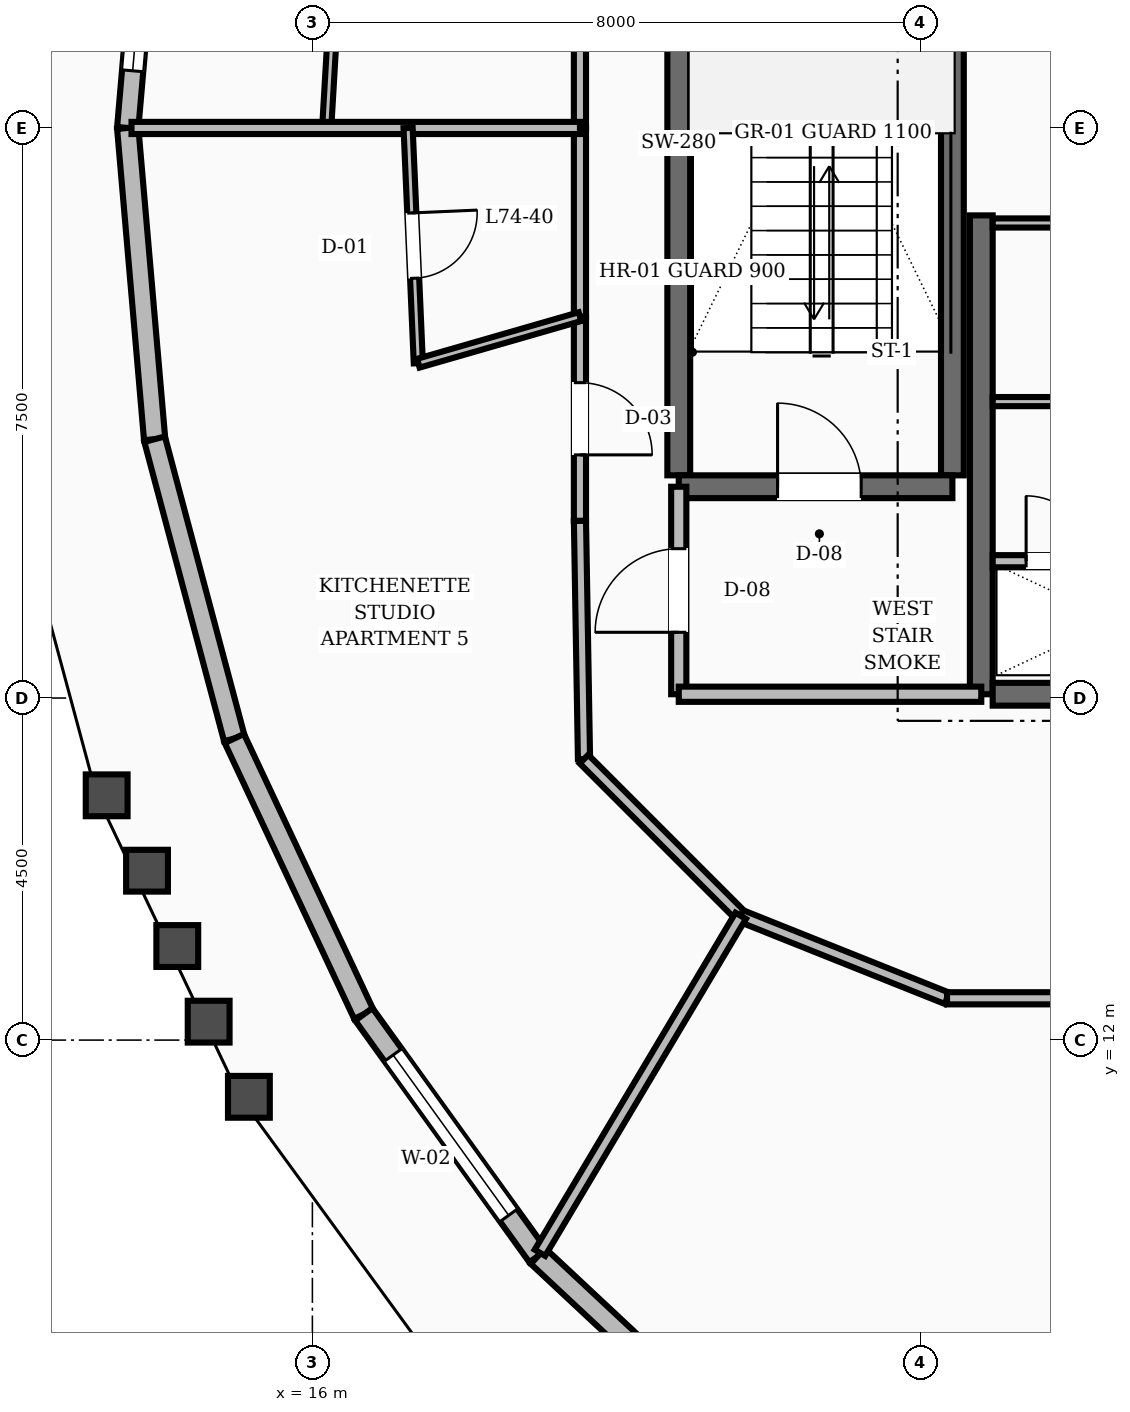
"""IFC4 building model, lengths in metres.
Left out: names, types, materials, properties, quantities, classifications, styles, units other than length and angle.
Written with IfcOpenShell. Run it as: python <this file> out.ifc"""

import sys

from ifc_helpers import new_model, si_unit, direction, frame, frame_2d, origin, place, context, subcontext, project, spatial, rectangle, extrude, element, fill, save


model = new_model("IFC4")
c1 = context("Model", 3, precision=1e-05, world=origin(), true_north=direction((0.0, 1.0)))
c2 = subcontext(c1, "Body", "Model", "MODEL_VIEW")
j1 = project(units=[si_unit("LENGTHUNIT", "METRE"), si_unit("PLANEANGLEUNIT", "RADIAN")], contexts=[c1])
p1 = place(None, origin())
s1 = spatial("IfcSite", under=j1, at=p1, CompositionType="ELEMENT")
p2 = place(p1, origin())
s2 = spatial("IfcBuilding", under=s1, at=p2, CompositionType="ELEMENT")
p3 = place(p2, frame((0.0, 0.0, 283.2)))
s3 = spatial("IfcBuildingStorey", under=s2, at=p3, CompositionType="ELEMENT", Elevation=283.2)
p4 = place(p3, frame((24.8, 16.55, 0.0), z_axis=(0.0, 0.0, 1.0), x_axis=(0.0, 1.0, 0.0)))
e1 = element("IfcWall", 1, at=p4, inside=s3, PredefinedType="SHEAR", context=c2, shape_type="SweptSolid", body=[
    extrude(rectangle(XDim=6.3, YDim=0.3, at=frame_2d((3.15, 0.0))), origin(), (0.0, 0.0, 1.0), 3.6),
])
p5 = place(p3, frame((24.95, 16.55, 0.0), z_axis=(0.0, 0.0, 1.0), x_axis=(1.0, 0.0, 0.0)))
e2 = element("IfcWall", 2, at=p5, inside=s3, PredefinedType="SHEAR", context=c2, shape_type="SweptSolid", body=[
    extrude(rectangle(XDim=3.25, YDim=0.3, at=frame_2d((1.625, 0.0))), origin(), (0.0, 0.0, 1.0), 3.6),
])
for number, where, z_axis, x_axis in (
    (3, (20.82, 19.43, 0.0), (0.0, 0.0, 1.0), (0.0, 1.0, 0.0)),
    (4, (24.42, 19.43, 0.0), (0.0, 0.0, 1.0), (0.0, 1.0, 0.0)),
):
    element("IfcWall", number, at=place(p3, frame(where, z_axis=z_axis, x_axis=x_axis)), inside=s3, PredefinedType="SHEAR", context=c2, shape_type="SweptSolid", body=[
        extrude(rectangle(XDim=8.74, YDim=0.3, at=frame_2d((4.37, 0.0))), origin(), (0.0, 0.0, 1.0), 3.6),
    ])
p6 = place(p3, frame((20.82, 19.28, 0.0), z_axis=(0.0, 0.0, 1.0), x_axis=(1.0, 0.0, 0.0)))
e5 = element("IfcWall", 5, at=p6, inside=s3, PredefinedType="SHEAR", context=c2, shape_type="SweptSolid", body=[
    extrude(rectangle(XDim=3.6, YDim=0.3, at=frame_2d((1.8, 0.0))), origin(), (0.0, 0.0, 1.0), 3.6),
])
p7 = place(p6, frame((1.3, 0.0, 0.0)))
e6 = element("IfcOpeningElement", 6, at=p7, cuts=e5, PredefinedType="OPENING", context=c2, shape_type="SweptSolid", body=[
    extrude(rectangle(XDim=1.1, YDim=2.1, at=frame_2d((0.55, 1.05))), frame((0.0, 0.16, 0.0), z_axis=(0.0, -1.0, 0.0), x_axis=(1.0, 0.0, 0.0)), (0.0, 0.0, 1.0), 0.32),
])
p8 = place(p3, frame((13.924, 28.095, 0.0), z_axis=(0.0, 0.0, 1.0), x_axis=(-0.086132326102, -0.996283705779, 0.0)))
e7 = element("IfcWall", 7, at=p8, inside=s3, PredefinedType="STANDARD", context=c2, shape_type="SweptSolid", body=[
    extrude(rectangle(XDim=4.11, YDim=0.28, at=frame_2d((2.055, 0.0))), origin(), (0.0, 0.0, 1.0), 2.88),
])
p9 = place(p8, frame((0.755, 0.0, 0.8)))
e8 = element("IfcOpeningElement", 8, at=p9, cuts=e7, PredefinedType="OPENING", context=c2, shape_type="SweptSolid", body=[
    extrude(rectangle(XDim=2.6, YDim=1.65, at=frame_2d((1.3, 0.825))), frame((0.0, 0.15, 0.0), z_axis=(0.0, -1.0, 0.0), x_axis=(1.0, 0.0, 0.0)), (0.0, 0.0, 1.0), 0.3),
])
p10 = place(p3, frame((13.57, 24.0, 0.0), z_axis=(0.0, 0.0, 1.0), x_axis=(0.086132326102, -0.996283705779, 0.0)))
e9 = element("IfcWall", 9, at=p10, inside=s3, PredefinedType="STANDARD", context=c2, shape_type="SweptSolid", body=[
    extrude(rectangle(XDim=4.11, YDim=0.28, at=frame_2d((2.055, 0.0))), origin(), (0.0, 0.0, 1.0), 2.88),
])
p11 = place(p3, frame((13.924, 19.905, 0.0), z_axis=(0.0, 0.0, 1.0), x_axis=(0.257409045533, -0.966302531963, 0.0)))
e10 = element("IfcWall", 10, at=p11, inside=s3, PredefinedType="STANDARD", context=c2, shape_type="SweptSolid", body=[
    extrude(rectangle(XDim=4.074, YDim=0.28, at=frame_2d((2.037, 0.0))), origin(), (0.0, 0.0, 1.0), 2.88),
])
p12 = place(p3, frame((14.973, 15.968, 0.0), z_axis=(0.0, 0.0, 1.0), x_axis=(0.424881672648, -0.905248896297, 0.0)))
e11 = element("IfcWall", 11, at=p12, inside=s3, PredefinedType="STANDARD", context=c2, shape_type="SweptSolid", body=[
    extrude(rectangle(XDim=4.009, YDim=0.28, at=frame_2d((2.004, 0.0))), origin(), (0.0, 0.0, 1.0), 2.88),
])
p13 = place(p3, frame((16.676, 12.339, 0.0), z_axis=(0.0, 0.0, 1.0), x_axis=(0.584655758142, -0.811281482884, 0.0)))
e12 = element("IfcWall", 12, at=p13, inside=s3, PredefinedType="STANDARD", context=c2, shape_type="SweptSolid", body=[
    extrude(rectangle(XDim=3.92, YDim=0.28, at=frame_2d((1.96, 0.0))), origin(), (0.0, 0.0, 1.0), 2.88),
])
p14 = place(p13, frame((0.66, 0.0, 0.8)))
e13 = element("IfcOpeningElement", 13, at=p14, cuts=e12, PredefinedType="OPENING", context=c2, shape_type="SweptSolid", body=[
    extrude(rectangle(XDim=2.6, YDim=1.65, at=frame_2d((1.3, 0.825))), frame((0.0, 0.15, 0.0), z_axis=(0.0, -1.0, 0.0), x_axis=(1.0, 0.0, 0.0)), (0.0, 0.0, 1.0), 0.3),
])
p15 = place(p3, frame((18.968, 9.159, 0.0), z_axis=(0.0, 0.0, 1.0), x_axis=(0.730558106244, -0.682850535184, 0.0)))
e14 = element("IfcWall", 14, at=p15, inside=s3, PredefinedType="STANDARD", context=c2, shape_type="SweptSolid", body=[
    extrude(rectangle(XDim=3.823, YDim=0.28, at=frame_2d((1.911, 0.0))), origin(), (0.0, 0.0, 1.0), 2.88),
])
p16 = place(p3, frame((20.82, 16.55, 0.0), z_axis=(0.0, 0.0, 1.0), x_axis=(0.0, 1.0, 0.0)))
e15 = element("IfcWall", 15, at=p16, inside=s3, PredefinedType="SOLIDWALL", context=c2, shape_type="SweptSolid", body=[
    extrude(rectangle(XDim=2.73, YDim=0.2, at=frame_2d((1.365, 0.0))), origin(), (0.0, 0.0, 1.0), 2.87),
])
p17 = place(p16, frame((0.815, 0.0, 0.0)))
e16 = element("IfcOpeningElement", 16, at=p17, cuts=e15, PredefinedType="OPENING", context=c2, shape_type="SweptSolid", body=[
    extrude(rectangle(XDim=1.1, YDim=2.1, at=frame_2d((0.55, 1.05))), frame((0.0, 0.11, 0.0), z_axis=(0.0, -1.0, 0.0), x_axis=(1.0, 0.0, 0.0)), (0.0, 0.0, 1.0), 0.22),
])
p18 = place(p3, frame((20.82, 16.55, 0.0), z_axis=(0.0, 0.0, 1.0), x_axis=(1.0, 0.0, 0.0)))
e17 = element("IfcWall", 17, at=p18, inside=s3, PredefinedType="SOLIDWALL", context=c2, shape_type="SweptSolid", body=[
    extrude(rectangle(XDim=3.98, YDim=0.2, at=frame_2d((1.99, 0.0))), origin(), (0.0, 0.0, 1.0), 2.87),
])
p19 = place(p3, frame((24.95, 18.3, 0.0), z_axis=(0.0, 0.0, 1.0), x_axis=(1.0, 0.0, 0.0)))
e18 = element("IfcWall", 18, at=p19, inside=s3, PredefinedType="SOLIDWALL", context=c2, shape_type="SweptSolid", body=[
    extrude(rectangle(XDim=3.2, YDim=0.16, at=frame_2d((1.6, 0.0))), origin(), (0.0, 0.0, 1.0), 2.87),
])
p20 = place(p19, frame((0.44, 0.0, 0.0)))
e19 = element("IfcOpeningElement", 19, at=p20, cuts=e18, PredefinedType="OPENING", context=c2, shape_type="SweptSolid", body=[
    extrude(rectangle(XDim=0.86, YDim=2.05, at=frame_2d((0.43, 1.025))), frame((0.0, 0.09, 0.0), z_axis=(0.0, -1.0, 0.0), x_axis=(1.0, 0.0, 0.0)), (0.0, 0.0, 1.0), 0.18),
])
p21 = place(p3, frame((24.95, 22.75, 0.0), z_axis=(0.0, 0.0, 1.0), x_axis=(1.0, 0.0, 0.0)))
e20 = element("IfcWall", 20, at=p21, inside=s3, PredefinedType="PARTITIONING", context=c2, shape_type="SweptSolid", body=[
    extrude(rectangle(XDim=3.2, YDim=0.12, at=frame_2d((1.6, 0.0))), origin(), (0.0, 0.0, 1.0), 2.87),
])
p22 = place(p21, frame((1.125, 0.0, 0.0)))
e21 = element("IfcOpeningElement", 21, at=p22, cuts=e20, PredefinedType="OPENING", context=c2, shape_type="SweptSolid", body=[
    extrude(rectangle(XDim=0.95, YDim=2.1, at=frame_2d((0.475, 1.05))), frame((0.0, 0.07, 0.0), z_axis=(0.0, -1.0, 0.0), x_axis=(1.0, 0.0, 0.0)), (0.0, 0.0, 1.0), 0.14),
])
p23 = place(p3, frame((24.95, 20.4, 0.0), z_axis=(0.0, 0.0, 1.0), x_axis=(1.0, 0.0, 0.0)))
e22 = element("IfcWall", 22, at=p23, inside=s3, PredefinedType="PARTITIONING", context=c2, shape_type="SweptSolid", body=[
    extrude(rectangle(XDim=3.2, YDim=0.12, at=frame_2d((1.6, 0.0))), origin(), (0.0, 0.0, 1.0), 2.87),
])
p24 = place(p23, frame((1.125, 0.0, 0.0)))
e23 = element("IfcOpeningElement", 23, at=p24, cuts=e22, PredefinedType="OPENING", context=c2, shape_type="SweptSolid", body=[
    extrude(rectangle(XDim=0.95, YDim=2.1, at=frame_2d((0.475, 1.05))), frame((0.0, 0.07, 0.0), z_axis=(0.0, -1.0, 0.0), x_axis=(1.0, 0.0, 0.0)), (0.0, 0.0, 1.0), 0.14),
])
for number, where, z_axis, x_axis in (
    (24, (19.52, 26.482, 0.0), (0.0, 0.0, 1.0), (0.0, -1.0, 0.0)),
    (25, (19.52, 24.0, 0.0), (0.0, 0.0, 1.0), (0.0, -1.0, 0.0)),
):
    element("IfcWall", number, at=place(p3, frame(where, z_axis=z_axis, x_axis=x_axis)), inside=s3, PredefinedType="SOLIDWALL", context=c2, shape_type="SweptSolid", body=[
        extrude(rectangle(XDim=2.482, YDim=0.16, at=frame_2d((1.241, 0.0))), origin(), (0.0, 0.0, 1.0), 2.87),
    ])
p25 = place(p3, frame((19.52, 21.518, 0.0), z_axis=(0.0, 0.0, 1.0), x_axis=(0.0, -1.0, 0.0)))
e26 = element("IfcWall", 26, at=p25, inside=s3, PredefinedType="SOLIDWALL", context=c2, shape_type="SweptSolid", body=[
    extrude(rectangle(XDim=2.687, YDim=0.16, at=frame_2d((1.344, 0.0))), origin(), (0.0, 0.0, 1.0), 2.87),
])
p26 = place(p25, frame((0.868, 0.0, 0.0)))
e27 = element("IfcOpeningElement", 27, at=p26, cuts=e26, PredefinedType="OPENING", context=c2, shape_type="SweptSolid", body=[
    extrude(rectangle(XDim=0.95, YDim=2.1, at=frame_2d((0.475, 1.05))), frame((0.0, 0.09, 0.0), z_axis=(0.0, -1.0, 0.0), x_axis=(1.0, 0.0, 0.0)), (0.0, 0.0, 1.0), 0.18),
])
p27 = place(p3, frame((19.52, 18.831, 0.0), z_axis=(0.0, 0.0, 1.0), x_axis=(0.016981035134, -0.999855811828, 0.0)))
e28 = element("IfcWall", 28, at=p27, inside=s3, PredefinedType="SOLIDWALL", context=c2, shape_type="SweptSolid", body=[
    extrude(rectangle(XDim=3.134, YDim=0.16, at=frame_2d((1.567, 0.0))), origin(), (0.0, 0.0, 1.0), 2.87),
])
p28 = place(p3, frame((19.573, 15.697, 0.0), z_axis=(0.0, 0.0, 1.0), x_axis=(0.707106781187, -0.707106781187, 0.0)))
e29 = element("IfcWall", 29, at=p28, inside=s3, PredefinedType="SOLIDWALL", context=c2, shape_type="SweptSolid", body=[
    extrude(rectangle(XDim=2.916, YDim=0.16, at=frame_2d((1.458, 0.0))), origin(), (0.0, 0.0, 1.0), 2.87),
])
p29 = place(p3, frame((21.635, 13.635, 0.0), z_axis=(0.0, 0.0, 1.0), x_axis=(0.92856882165, -0.371160266542, 0.0)))
e30 = element("IfcWall", 30, at=p29, inside=s3, PredefinedType="SOLIDWALL", context=c2, shape_type="SweptSolid", body=[
    extrude(rectangle(XDim=2.923, YDim=0.16, at=frame_2d((1.461, 0.0))), origin(), (0.0, 0.0, 1.0), 2.87),
])
p30 = place(p3, frame((24.349, 12.55, 0.0), z_axis=(0.0, 0.0, 1.0), x_axis=(1.0, 0.0, 0.0)))
e31 = element("IfcWall", 31, at=p30, inside=s3, PredefinedType="SOLIDWALL", context=c2, shape_type="SweptSolid", body=[
    extrude(rectangle(XDim=2.908, YDim=0.16, at=frame_2d((1.454, 0.0))), origin(), (0.0, 0.0, 1.0), 2.87),
])
p31 = place(p3, frame((16.386, 27.385, 0.0), z_axis=(0.0, 0.0, 1.0), x_axis=(-0.058460353497, -0.998289731025, 0.0)))
e32 = element("IfcWall", 32, at=p31, inside=s3, PredefinedType="PARTITIONING", context=c2, shape_type="SweptSolid", body=[
    extrude(rectangle(XDim=3.391, YDim=0.12, at=frame_2d((1.696, 0.0))), origin(), (0.0, 0.0, 1.0), 2.87),
])
p32 = place(p31, frame((1.22, 0.0, 0.0)))
e33 = element("IfcOpeningElement", 33, at=p32, cuts=e32, PredefinedType="OPENING", context=c2, shape_type="SweptSolid", body=[
    extrude(rectangle(XDim=0.95, YDim=2.1, at=frame_2d((0.475, 1.05))), frame((0.0, 0.07, 0.0), z_axis=(0.0, -1.0, 0.0), x_axis=(1.0, 0.0, 0.0)), (0.0, 0.0, 1.0), 0.14),
])
p33 = place(p3, frame((19.52, 24.0, 0.0), z_axis=(0.0, 0.0, 1.0), x_axis=(-1.0, 0.0, 0.0)))
e34 = element("IfcWall", 34, at=p33, inside=s3, PredefinedType="SOLIDWALL", context=c2, shape_type="SweptSolid", body=[
    extrude(rectangle(XDim=5.9, YDim=0.16, at=frame_2d((2.95, 0.0))), origin(), (0.0, 0.0, 1.0), 2.87),
])
p34 = place(p3, frame((17.259, 24.0, 0.0), z_axis=(0.0, 0.0, 1.0), x_axis=(0.04349877907, -0.99905348016, 0.0)))
e35 = element("IfcWall", 35, at=p34, inside=s3, PredefinedType="PARTITIONING", context=c2, shape_type="SweptSolid", body=[
    extrude(rectangle(XDim=3.098, YDim=0.12, at=frame_2d((1.549, 0.0))), origin(), (0.0, 0.0, 1.0), 2.87),
])
p35 = place(p34, frame((1.119, 0.0, 0.0)))
e36 = element("IfcOpeningElement", 36, at=p35, cuts=e35, PredefinedType="OPENING", context=c2, shape_type="SweptSolid", body=[
    extrude(rectangle(XDim=0.86, YDim=2.1, at=frame_2d((0.43, 1.05))), frame((0.0, 0.07, 0.0), z_axis=(0.0, -1.0, 0.0), x_axis=(1.0, 0.0, 0.0)), (0.0, 0.0, 1.0), 0.14),
])
p36 = place(p3, frame((19.52, 21.518, 0.0), z_axis=(0.0, 0.0, 1.0), x_axis=(-0.960888543989, -0.27693538241, 0.0)))
e37 = element("IfcWall", 37, at=p36, inside=s3, PredefinedType="PARTITIONING", context=c2, shape_type="SweptSolid", body=[
    extrude(rectangle(XDim=2.213, YDim=0.12, at=frame_2d((1.106, 0.0))), origin(), (0.0, 0.0, 1.0), 2.87),
])
p37 = place(p3, frame((21.635, 13.635, 0.0), z_axis=(0.0, 0.0, 1.0), x_axis=(-0.511821520019, -0.859091806296, 0.0)))
e38 = element("IfcWall", 38, at=p37, inside=s3, PredefinedType="SOLIDWALL", context=c2, shape_type="SweptSolid", body=[
    extrude(rectangle(XDim=5.16, YDim=0.16, at=frame_2d((2.58, 0.0))), origin(), (0.0, 0.0, 1.0), 2.87),
])
p38 = place(p9, origin())
e39 = element("IfcWindow", 39, at=p38, inside=s3, PartitioningType="SINGLE_PANEL", PredefinedType="WINDOW", context=c2, shape_type="SweptSolid", body=[
    extrude(rectangle(XDim=2.6, YDim=1.65, at=frame_2d((1.3, 0.825))), frame((0.0, 0.03, 0.0), z_axis=(0.0, -1.0, 0.0), x_axis=(1.0, 0.0, 0.0)), (0.0, 0.0, 1.0), 0.06),
])
fill(e8, e39)
p39 = place(p14, origin())
e40 = element("IfcWindow", 40, at=p39, inside=s3, PartitioningType="SINGLE_PANEL", PredefinedType="WINDOW", context=c2, shape_type="SweptSolid", body=[
    extrude(rectangle(XDim=2.6, YDim=1.65, at=frame_2d((1.3, 0.825))), frame((0.0, 0.03, 0.0), z_axis=(0.0, -1.0, 0.0), x_axis=(1.0, 0.0, 0.0)), (0.0, 0.0, 1.0), 0.06),
])
fill(e13, e40)
p40 = place(p7, origin())
e41 = element("IfcDoor", 41, at=p40, inside=s3, OperationType="SINGLE_SWING_LEFT", PredefinedType="DOOR", context=c2, shape_type="SweptSolid", body=[
    extrude(rectangle(XDim=1.1, YDim=2.1, at=frame_2d((0.55, 1.05))), frame((0.0, 0.025, 0.0), z_axis=(0.0, -1.0, 0.0), x_axis=(1.0, 0.0, 0.0)), (0.0, 0.0, 1.0), 0.05),
])
fill(e6, e41)
p41 = place(p17, origin())
e42 = element("IfcDoor", 42, at=p41, inside=s3, OperationType="SINGLE_SWING_LEFT", PredefinedType="DOOR", context=c2, shape_type="SweptSolid", body=[
    extrude(rectangle(XDim=1.1, YDim=2.1, at=frame_2d((0.55, 1.05))), frame((0.0, 0.025, 0.0), z_axis=(0.0, -1.0, 0.0), x_axis=(1.0, 0.0, 0.0)), (0.0, 0.0, 1.0), 0.05),
])
fill(e16, e42)
p42 = place(p20, origin())
e43 = element("IfcDoor", 43, at=p42, inside=s3, OperationType="SINGLE_SWING_LEFT", PredefinedType="TRAPDOOR", context=c2, shape_type="SweptSolid", body=[
    extrude(rectangle(XDim=0.86, YDim=2.05, at=frame_2d((0.43, 1.025))), frame((0.0, 0.025, 0.0), z_axis=(0.0, -1.0, 0.0), x_axis=(1.0, 0.0, 0.0)), (0.0, 0.0, 1.0), 0.05),
])
fill(e19, e43)
p43 = place(p35, origin())
e44 = element("IfcDoor", 44, at=p43, inside=s3, OperationType="SINGLE_SWING_LEFT", PredefinedType="DOOR", context=c2, shape_type="SweptSolid", body=[
    extrude(rectangle(XDim=0.86, YDim=2.1, at=frame_2d((0.43, 1.05))), frame((0.0, 0.025, 0.0), z_axis=(0.0, -1.0, 0.0), x_axis=(1.0, 0.0, 0.0)), (0.0, 0.0, 1.0), 0.05),
])
fill(e36, e44)
p44 = place(p26, origin())
e45 = element("IfcDoor", 45, at=p44, inside=s3, OperationType="SINGLE_SWING_RIGHT", PredefinedType="DOOR", context=c2, shape_type="SweptSolid", body=[
    extrude(rectangle(XDim=0.95, YDim=2.1, at=frame_2d((0.475, 1.05))), frame((0.0, 0.025, 0.0), z_axis=(0.0, -1.0, 0.0), x_axis=(1.0, 0.0, 0.0)), (0.0, 0.0, 1.0), 0.05),
])
fill(e27, e45)
save(model, sys.argv[1])
